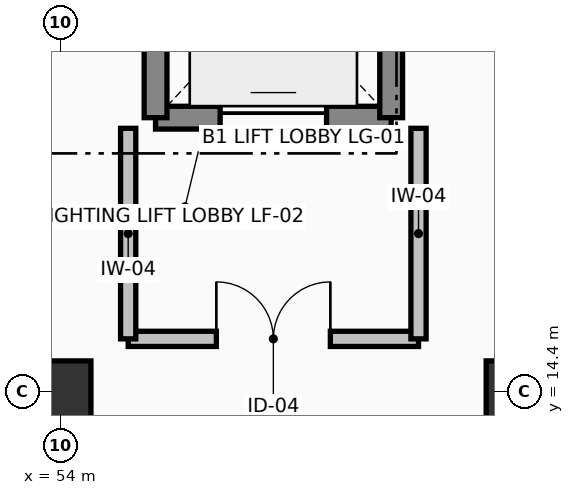
"""IFC4 building model, lengths in metres.
Left out: names, types, materials, properties, quantities, classifications, styles, units other than length and angle.
Written with IfcOpenShell. Run it as: python <this file> out.ifc"""

import sys

from ifc_helpers import new_model, si_unit, direction, frame, frame_2d, origin, origin_2d, place, context, subcontext, project, spatial, rectangle, extrude, element, fill, save


model = new_model("IFC4")
c1 = context("Model", 3, precision=1e-05, world=origin(), true_north=direction((0.0, 1.0)))
c2 = subcontext(c1, "Body", "Model", "MODEL_VIEW")
j1 = project(units=[si_unit("LENGTHUNIT", "METRE"), si_unit("PLANEANGLEUNIT", "RADIAN")], contexts=[c1])
p1 = place(None, origin())
s1 = spatial("IfcSite", under=j1, at=p1, CompositionType="ELEMENT")
p2 = place(p1, origin())
s2 = spatial("IfcBuilding", under=s1, at=p2, CompositionType="ELEMENT")
p3 = place(p2, frame((0.0, 0.0, -4.08)))
s3 = spatial("IfcBuildingStorey", under=s2, at=p3, CompositionType="ELEMENT", Elevation=-4.08)
for number, where, z_axis, x_axis in (
    (1, (54.0, 14.4, -0.42), (0.0, 0.0, 1.0), (1.0, 0.0, 0.0)),
    (2, (60.0, 14.4, -0.42), (0.0, 0.0, 1.0), (1.0, 0.0, 0.0)),
):
    element("IfcColumn", number, at=place(p3, frame(where, z_axis=z_axis, x_axis=x_axis)), inside=s3, PredefinedType="COLUMN", context=c2, shape_type="SweptSolid", body=[
        extrude(rectangle(XDim=0.8, YDim=0.8, at=origin_2d()), origin(), (0.0, 0.0, 1.0), 4.5),
    ])
p4 = place(p3, frame((55.25, 18.0, 0.0), z_axis=(0.0, 0.0, 1.0), x_axis=(1.0, 0.0, 0.0)))
e3 = element("IfcWall", 3, at=p4, inside=s3, PredefinedType="SHEAR", context=c2, shape_type="SweptSolid", body=[
    extrude(rectangle(XDim=3.1, YDim=0.3, at=frame_2d((1.55, 0.0))), origin(), (0.0, 0.0, 1.0), 4.08),
])
p5 = place(p4, frame((0.85, 0.0, 0.0)))
e4 = element("IfcOpeningElement", 4, at=p5, cuts=e3, PredefinedType="OPENING", context=c2, shape_type="SweptSolid", body=[
    extrude(rectangle(XDim=1.4, YDim=2.25, at=frame_2d((0.7, 1.125))), frame((0.0, 0.16, 0.0), z_axis=(0.0, -1.0, 0.0), x_axis=(1.0, 0.0, 0.0)), (0.0, 0.0, 1.0), 0.32),
])
for number, where, z_axis, x_axis in (
    (5, (55.25, 18.0, 0.0), (0.0, 0.0, 1.0), (0.0, 1.0, 0.0)),
    (6, (58.35, 18.0, 0.0), (0.0, 0.0, 1.0), (0.0, 1.0, 0.0)),
):
    element("IfcWall", number, at=place(p3, frame(where, z_axis=z_axis, x_axis=x_axis)), inside=s3, PredefinedType="SHEAR", context=c2, shape_type="SweptSolid", body=[
        extrude(rectangle(XDim=3.3, YDim=0.3, at=frame_2d((1.65, 0.0))), origin(), (0.0, 0.0, 1.0), 4.08),
    ])
p6 = place(p3, frame((54.89, 15.09, 0.0), z_axis=(0.0, 0.0, 1.0), x_axis=(1.0, 0.0, 0.0)))
e7 = element("IfcWall", 7, at=p6, inside=s3, PredefinedType="PARTITIONING", context=c2, shape_type="SweptSolid", body=[
    extrude(rectangle(XDim=3.82, YDim=0.2, at=frame_2d((1.91, 0.0))), origin(), (0.0, 0.0, 1.0), 3.78),
])
p7 = place(p6, frame((1.16, 0.0, 0.0)))
e8 = element("IfcOpeningElement", 8, at=p7, cuts=e7, PredefinedType="OPENING", context=c2, shape_type="SweptSolid", body=[
    extrude(rectangle(XDim=1.5, YDim=2.2, at=frame_2d((0.75, 1.1))), frame((0.0, 0.11, 0.0), z_axis=(0.0, -1.0, 0.0), x_axis=(1.0, 0.0, 0.0)), (0.0, 0.0, 1.0), 0.22),
])
for number, where, z_axis, x_axis in (
    (9, (58.71, 15.09, 0.0), (0.0, 0.0, 1.0), (0.0, 1.0, 0.0)),
    (10, (54.89, 17.86, 0.0), (0.0, 0.0, 1.0), (0.0, -1.0, 0.0)),
):
    element("IfcWall", number, at=place(p3, frame(where, z_axis=z_axis, x_axis=x_axis)), inside=s3, PredefinedType="PARTITIONING", context=c2, shape_type="SweptSolid", body=[
        extrude(rectangle(XDim=2.77, YDim=0.2, at=frame_2d((1.385, 0.0))), origin(), (0.0, 0.0, 1.0), 3.78),
    ])
p8 = place(p5, origin())
e11 = element("IfcDoor", 11, at=p8, inside=s3, OperationType="SLIDING_TO_LEFT", PredefinedType="DOOR", context=c2, shape_type="SweptSolid", body=[
    extrude(rectangle(XDim=1.4, YDim=2.25, at=frame_2d((0.7, 1.125))), frame((0.0, 0.025, 0.0), z_axis=(0.0, -1.0, 0.0), x_axis=(1.0, 0.0, 0.0)), (0.0, 0.0, 1.0), 0.05),
])
fill(e4, e11)
p9 = place(p7, origin())
e12 = element("IfcDoor", 12, at=p9, inside=s3, OperationType="DOUBLE_SWING_LEFT", PredefinedType="DOOR", context=c2, shape_type="SweptSolid", body=[
    extrude(rectangle(XDim=1.5, YDim=2.2, at=frame_2d((0.75, 1.1))), frame((0.0, 0.025, 0.0), z_axis=(0.0, -1.0, 0.0), x_axis=(1.0, 0.0, 0.0)), (0.0, 0.0, 1.0), 0.05),
])
fill(e8, e12)
save(model, sys.argv[1])
